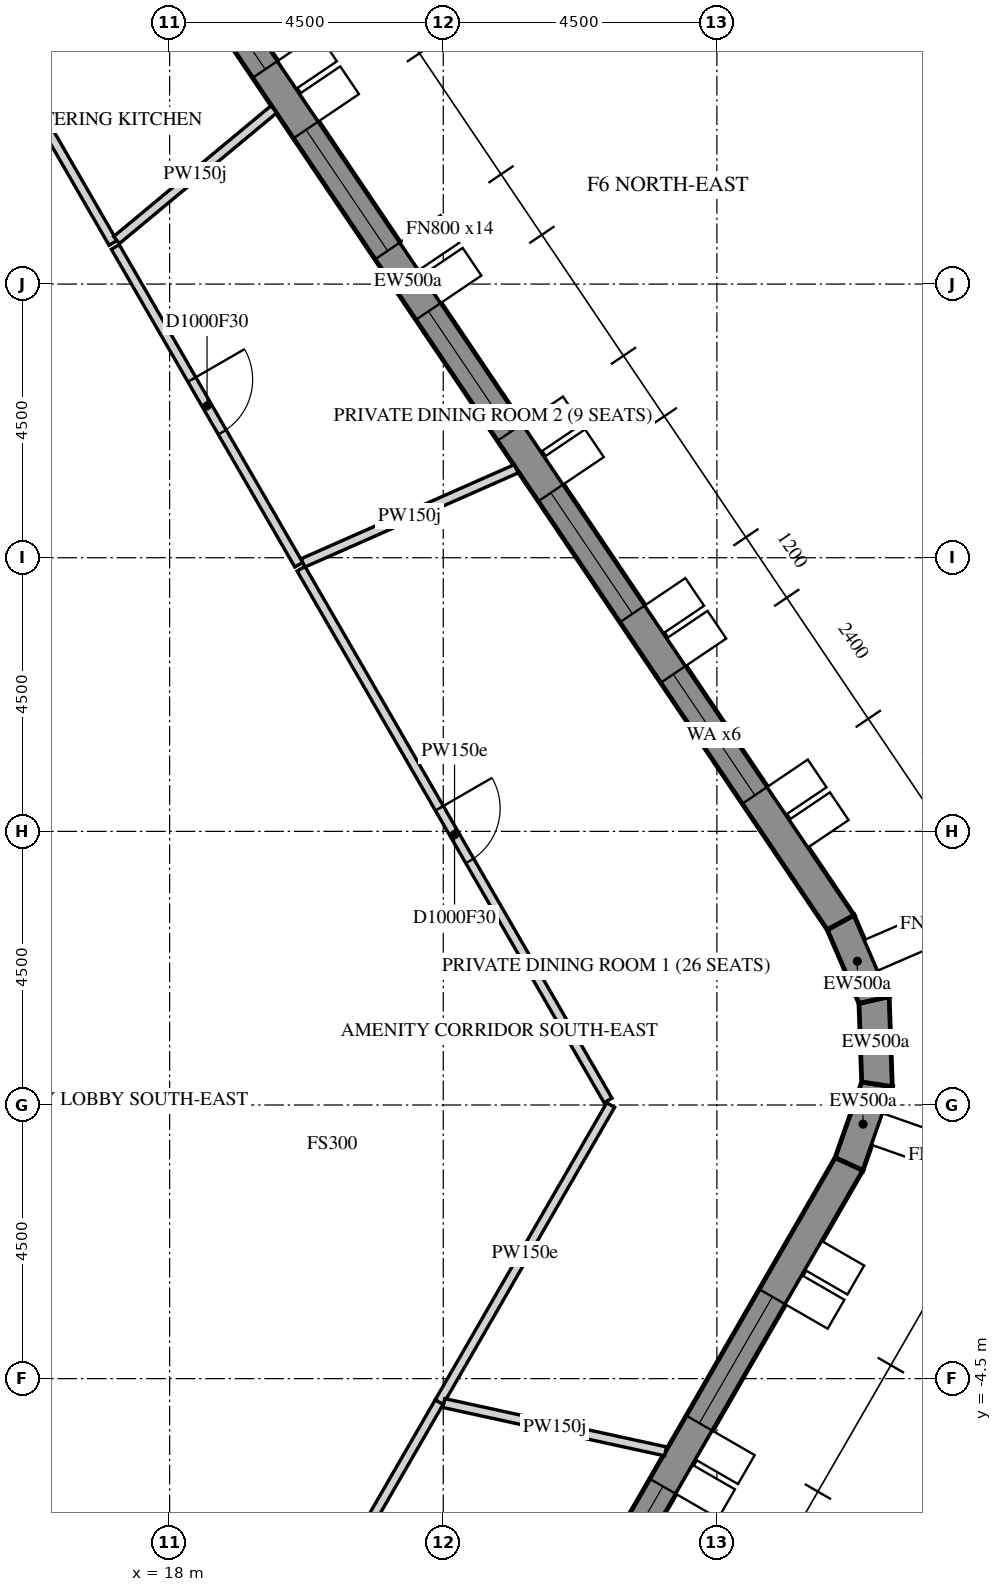
"""IFC4 building model, lengths in metres.
Left out: names, types, materials, properties, quantities, classifications, styles, units other than length and angle.
Written with IfcOpenShell. Run it as: python <this file> out.ifc"""

import sys

from ifc_helpers import new_model, si_unit, direction, frame, frame_2d, origin, place, context, subcontext, project, spatial, polyline, rectangle, outline, extrude, element, fill, save


model = new_model("IFC4")
c1 = context("Model", 3, precision=1e-05, world=origin(), true_north=direction((0.0, 1.0)))
c2 = subcontext(c1, "Body", "Model", "MODEL_VIEW")
j1 = project(units=[si_unit("LENGTHUNIT", "METRE"), si_unit("PLANEANGLEUNIT", "RADIAN")], contexts=[c1])
p1 = place(None, origin())
s1 = spatial("IfcSite", under=j1, at=p1, CompositionType="ELEMENT")
p2 = place(p1, origin())
s2 = spatial("IfcBuilding", under=s1, at=p2, CompositionType="ELEMENT")
p3 = place(p2, frame((0.0, 0.0, 338.1)))
s3 = spatial("IfcBuildingStorey", under=s2, at=p3, CompositionType="ELEMENT", Elevation=338.1)
p4 = place(p3, frame((16.451, -23.005, -0.3), z_axis=(0.0, 0.0, 1.0), x_axis=(0.500003737743, 0.866023245787, 0.0)))
e1 = element("IfcWall", 1, at=p4, inside=s3, PredefinedType="SOLIDWALL", context=c2, shape_type="SweptSolid", body=[
    extrude(outline(polyline([(-0.021, -0.25), (25.468, -0.25), (25.421, 0.25), (0.021, 0.25), (-0.021, -0.25)])), origin(), (0.0, 0.0, 1.0), 5.4),
])
p5 = place(p4, frame((2.522, 0.0, 1.2)))
e2 = element("IfcOpeningElement", 2, at=p5, cuts=e1, PredefinedType="OPENING", context=c2, shape_type="SweptSolid", body=[
    extrude(rectangle(XDim=2.4, YDim=3.6, at=frame_2d((1.2, 1.8))), frame((0.0, 0.26, 0.0), z_axis=(0.0, -1.0, 0.0), x_axis=(1.0, 0.0, 0.0)), (0.0, 0.0, 1.0), 0.52),
])
p6 = place(p4, frame((6.122, 0.0, 1.2)))
e3 = element("IfcOpeningElement", 3, at=p6, cuts=e1, PredefinedType="OPENING", context=c2, shape_type="SweptSolid", body=[
    extrude(rectangle(XDim=2.4, YDim=3.6, at=frame_2d((1.2, 1.8))), frame((0.0, 0.26, 0.0), z_axis=(0.0, -1.0, 0.0), x_axis=(1.0, 0.0, 0.0)), (0.0, 0.0, 1.0), 0.52),
])
p7 = place(p4, frame((9.722, 0.0, 1.2)))
e4 = element("IfcOpeningElement", 4, at=p7, cuts=e1, PredefinedType="OPENING", context=c2, shape_type="SweptSolid", body=[
    extrude(rectangle(XDim=2.4, YDim=3.6, at=frame_2d((1.2, 1.8))), frame((0.0, 0.26, 0.0), z_axis=(0.0, -1.0, 0.0), x_axis=(1.0, 0.0, 0.0)), (0.0, 0.0, 1.0), 0.52),
])
p8 = place(p4, frame((13.323, 0.0, 1.2)))
e5 = element("IfcOpeningElement", 5, at=p8, cuts=e1, PredefinedType="OPENING", context=c2, shape_type="SweptSolid", body=[
    extrude(rectangle(XDim=2.4, YDim=3.6, at=frame_2d((1.2, 1.8))), frame((0.0, 0.26, 0.0), z_axis=(0.0, -1.0, 0.0), x_axis=(1.0, 0.0, 0.0)), (0.0, 0.0, 1.0), 0.52),
])
p9 = place(p4, frame((16.922, 0.0, 1.2)))
e6 = element("IfcOpeningElement", 6, at=p9, cuts=e1, PredefinedType="OPENING", context=c2, shape_type="SweptSolid", body=[
    extrude(rectangle(XDim=2.4, YDim=3.6, at=frame_2d((1.2, 1.8))), frame((0.0, 0.26, 0.0), z_axis=(0.0, -1.0, 0.0), x_axis=(1.0, 0.0, 0.0)), (0.0, 0.0, 1.0), 0.52),
])
p10 = place(p4, frame((20.522, 0.0, 1.2)))
e7 = element("IfcOpeningElement", 7, at=p10, cuts=e1, PredefinedType="OPENING", context=c2, shape_type="SweptSolid", body=[
    extrude(rectangle(XDim=2.4, YDim=3.6, at=frame_2d((1.2, 1.8))), frame((0.0, 0.26, 0.0), z_axis=(0.0, -1.0, 0.0), x_axis=(1.0, 0.0, 0.0)), (0.0, 0.0, 1.0), 0.52),
])
p11 = place(p3, frame((29.174, -0.97, -0.3), z_axis=(0.0, 0.0, 1.0), x_axis=(0.330961348063, 0.943644311215, 0.0)))
e8 = element("IfcWall", 8, at=p11, inside=s3, PredefinedType="SOLIDWALL", context=c2, shape_type="SweptSolid", body=[
    extrude(outline(polyline([(-0.023, -0.25), (1.435, -0.25), (1.341, 0.25), (0.023, 0.25), (-0.023, -0.25)])), origin(), (0.0, 0.0, 1.0), 5.4),
])
p12 = place(p3, frame((29.633, 0.34, -0.3), z_axis=(0.0, 0.0, 1.0), x_axis=(-0.034825746769, 0.999393399699, 0.0)))
e9 = element("IfcWall", 9, at=p12, inside=s3, PredefinedType="SOLIDWALL", context=c2, shape_type="SweptSolid", body=[
    extrude(outline(polyline([(-0.047, -0.25), (1.435, -0.25), (1.341, 0.25), (0.047, 0.25), (-0.047, -0.25)])), origin(), (0.0, 0.0, 1.0), 5.4),
])
p13 = place(p3, frame((29.585, 1.728, -0.3), z_axis=(0.0, 0.0, 1.0), x_axis=(-0.396146339195, 0.918187387162, 0.0)))
e10 = element("IfcWall", 10, at=p13, inside=s3, PredefinedType="SOLIDWALL", context=c2, shape_type="SweptSolid", body=[
    extrude(outline(polyline([(-0.047, -0.25), (1.412, -0.25), (1.365, 0.25), (0.047, 0.25), (-0.047, -0.25)])), origin(), (0.0, 0.0, 1.0), 5.4),
])
p14 = place(p3, frame((29.035, 3.002, -0.3), z_axis=(0.0, 0.0, 1.0), x_axis=(-0.559195809204, 0.829035612606, 0.0)))
e11 = element("IfcWall", 11, at=p14, inside=s3, PredefinedType="SOLIDWALL", context=c2, shape_type="SweptSolid", body=[
    extrude(outline(polyline([(-0.023, -0.25), (25.465, -0.25), (25.424, 0.25), (0.023, 0.25), (-0.023, -0.25)])), origin(), (0.0, 0.0, 1.0), 5.4),
])
p15 = place(p14, frame((2.522, 0.0, 1.2)))
e12 = element("IfcOpeningElement", 12, at=p15, cuts=e11, PredefinedType="OPENING", context=c2, shape_type="SweptSolid", body=[
    extrude(rectangle(XDim=2.4, YDim=3.6, at=frame_2d((1.2, 1.8))), frame((0.0, 0.26, 0.0), z_axis=(0.0, -1.0, 0.0), x_axis=(1.0, 0.0, 0.0)), (0.0, 0.0, 1.0), 0.52),
])
p16 = place(p14, frame((6.122, 0.0, 1.2)))
e13 = element("IfcOpeningElement", 13, at=p16, cuts=e11, PredefinedType="OPENING", context=c2, shape_type="SweptSolid", body=[
    extrude(rectangle(XDim=2.4, YDim=3.6, at=frame_2d((1.2, 1.8))), frame((0.0, 0.26, 0.0), z_axis=(0.0, -1.0, 0.0), x_axis=(1.0, 0.0, 0.0)), (0.0, 0.0, 1.0), 0.52),
])
p17 = place(p14, frame((9.722, 0.0, 1.2)))
e14 = element("IfcOpeningElement", 14, at=p17, cuts=e11, PredefinedType="OPENING", context=c2, shape_type="SweptSolid", body=[
    extrude(rectangle(XDim=2.4, YDim=3.6, at=frame_2d((1.2, 1.8))), frame((0.0, 0.26, 0.0), z_axis=(0.0, -1.0, 0.0), x_axis=(1.0, 0.0, 0.0)), (0.0, 0.0, 1.0), 0.52),
])
p18 = place(p14, frame((13.323, 0.0, 1.2)))
e15 = element("IfcOpeningElement", 15, at=p18, cuts=e11, PredefinedType="OPENING", context=c2, shape_type="SweptSolid", body=[
    extrude(rectangle(XDim=2.4, YDim=3.6, at=frame_2d((1.2, 1.8))), frame((0.0, 0.26, 0.0), z_axis=(0.0, -1.0, 0.0), x_axis=(1.0, 0.0, 0.0)), (0.0, 0.0, 1.0), 0.52),
])
p19 = place(p14, frame((16.922, 0.0, 1.2)))
e16 = element("IfcOpeningElement", 16, at=p19, cuts=e11, PredefinedType="OPENING", context=c2, shape_type="SweptSolid", body=[
    extrude(rectangle(XDim=2.4, YDim=3.6, at=frame_2d((1.2, 1.8))), frame((0.0, 0.26, 0.0), z_axis=(0.0, -1.0, 0.0), x_axis=(1.0, 0.0, 0.0)), (0.0, 0.0, 1.0), 0.52),
])
p20 = place(p14, frame((20.522, 0.0, 1.2)))
e17 = element("IfcOpeningElement", 17, at=p20, cuts=e11, PredefinedType="OPENING", context=c2, shape_type="SweptSolid", body=[
    extrude(rectangle(XDim=2.4, YDim=3.6, at=frame_2d((1.2, 1.8))), frame((0.0, 0.26, 0.0), z_axis=(0.0, -1.0, 0.0), x_axis=(1.0, 0.0, 0.0)), (0.0, 0.0, 1.0), 0.52),
])
p21 = place(p3, frame((22.433, -4.885, 0.0), z_axis=(0.0, 0.0, 1.0), x_axis=(-0.500015036681, -0.866016722178, 0.0)))
e18 = element("IfcWall", 18, at=p21, inside=s3, PredefinedType="PARTITIONING", context=c2, shape_type="SweptSolid", body=[
    extrude(rectangle(XDim=19.382, YDim=0.15, at=frame_2d((9.691, 0.0))), origin(), (0.0, 0.0, 1.0), 5.1),
])
p22 = place(p21, frame((8.791, 0.0, 0.0)))
e19 = element("IfcOpeningElement", 19, at=p22, cuts=e18, PredefinedType="OPENING", context=c2, shape_type="SweptSolid", body=[
    extrude(rectangle(XDim=1.8, YDim=2.1, at=frame_2d((0.9, 1.05))), frame((0.0, 0.085, 0.0), z_axis=(0.0, -1.0, 0.0), x_axis=(1.0, 0.0, 0.0)), (0.0, 0.0, 1.0), 0.17),
])
p23 = place(p3, frame((12.742, 21.67, 0.0), z_axis=(0.0, 0.0, 1.0), x_axis=(0.500047259291, -0.865998116901, 0.0)))
e20 = element("IfcWall", 20, at=p23, inside=s3, PredefinedType="PARTITIONING", context=c2, shape_type="SweptSolid", body=[
    extrude(rectangle(XDim=8.654, YDim=0.15, at=frame_2d((4.327, 0.0))), origin(), (0.0, 0.0, 1.0), 5.1),
])
p24 = place(p23, frame((3.727, 0.0, 0.0)))
e21 = element("IfcOpeningElement", 21, at=p24, cuts=e20, PredefinedType="OPENING", context=c2, shape_type="SweptSolid", body=[
    extrude(rectangle(XDim=1.2, YDim=2.1, at=frame_2d((0.6, 1.05))), frame((0.0, 0.085, 0.0), z_axis=(0.0, -1.0, 0.0), x_axis=(1.0, 0.0, 0.0)), (0.0, 0.0, 1.0), 0.17),
])
p25 = place(p3, frame((19.714, 16.374, 0.0), z_axis=(0.0, 0.0, 1.0), x_axis=(-0.769119005656, -0.639105589976, 0.0)))
e22 = element("IfcWall", 22, at=p25, inside=s3, PredefinedType="PARTITIONING", context=c2, shape_type="SweptSolid", body=[
    extrude(rectangle(XDim=3.363, YDim=0.15, at=frame_2d((1.682, 0.0))), origin(), (0.0, 0.0, 1.0), 4.346),
])
p26 = place(p3, frame((17.107, 14.11, 0.0), z_axis=(0.0, 0.0, 1.0), x_axis=(0.499976943081, -0.866038715293, 0.0)))
e23 = element("IfcWall", 23, at=p26, inside=s3, PredefinedType="PARTITIONING", context=c2, shape_type="SweptSolid", body=[
    extrude(rectangle(XDim=6.034, YDim=0.15, at=frame_2d((3.017, 0.0))), origin(), (0.0, 0.0, 1.0), 5.1),
])
p27 = place(p26, frame((2.517, 0.0, 0.0)))
e24 = element("IfcOpeningElement", 24, at=p27, cuts=e23, PredefinedType="OPENING", context=c2, shape_type="SweptSolid", body=[
    extrude(rectangle(XDim=1.0, YDim=2.1, at=frame_2d((0.5, 1.05))), frame((0.0, 0.085, 0.0), z_axis=(0.0, -1.0, 0.0), x_axis=(1.0, 0.0, 0.0)), (0.0, 0.0, 1.0), 0.17),
])
p28 = place(p3, frame((22.433, -4.885, 0.0), z_axis=(0.0, 0.0, 1.0), x_axis=(0.499928530066, 0.866066663038, 0.0)))
e25 = element("IfcWall", 25, at=p28, inside=s3, PredefinedType="PARTITIONING", context=c2, shape_type="SweptSolid", body=[
    extrude(rectangle(XDim=5.64, YDim=0.15, at=frame_2d((2.82, 0.0))), origin(), (0.0, 0.0, 1.0), 5.1),
])
p29 = place(p3, frame((23.701, 10.463, 0.0), z_axis=(0.0, 0.0, 1.0), x_axis=(-0.914843094331, -0.403809500574, 0.0)))
e26 = element("IfcWall", 26, at=p29, inside=s3, PredefinedType="PARTITIONING", context=c2, shape_type="SweptSolid", body=[
    extrude(rectangle(XDim=3.834, YDim=0.15, at=frame_2d((1.917, 0.0))), origin(), (0.0, 0.0, 1.0), 4.346),
])
p30 = place(p3, frame((20.162, 8.819, 0.0), z_axis=(0.0, 0.0, 1.0), x_axis=(0.499995964007, -0.866027733953, 0.0)))
e27 = element("IfcWall", 27, at=p30, inside=s3, PredefinedType="PARTITIONING", context=c2, shape_type="SweptSolid", body=[
    extrude(rectangle(XDim=10.096, YDim=0.15, at=frame_2d((5.048, 0.0))), origin(), (0.0, 0.0, 1.0), 5.1),
])
p31 = place(p30, frame((4.548, 0.0, 0.0)))
e28 = element("IfcOpeningElement", 28, at=p31, cuts=e27, PredefinedType="OPENING", context=c2, shape_type="SweptSolid", body=[
    extrude(rectangle(XDim=1.0, YDim=2.1, at=frame_2d((0.5, 1.05))), frame((0.0, 0.085, 0.0), z_axis=(0.0, -1.0, 0.0), x_axis=(1.0, 0.0, 0.0)), (0.0, 0.0, 1.0), 0.17),
])
p32 = place(p3, frame((26.156, -5.696, 0.0), z_axis=(0.0, 0.0, 1.0), x_axis=(-0.977088296013, 0.212834352948, 0.0)))
e29 = element("IfcWall", 29, at=p32, inside=s3, PredefinedType="PARTITIONING", context=c2, shape_type="SweptSolid", body=[
    extrude(rectangle(XDim=3.731, YDim=0.15, at=frame_2d((1.866, 0.0))), origin(), (0.0, 0.0, 1.0), 4.346),
])
p33 = place(p9, frame((0.0, 0.18, 0.0)))
e30 = element("IfcWindow", 30, at=p33, inside=s3, PartitioningType="DOUBLE_PANEL_VERTICAL", PredefinedType="WINDOW", context=c2, shape_type="SweptSolid", body=[
    extrude(rectangle(XDim=2.4, YDim=3.6, at=frame_2d((1.2, 1.8))), frame((0.0, 0.03, 0.0), z_axis=(0.0, -1.0, 0.0), x_axis=(1.0, 0.0, 0.0)), (0.0, 0.0, 1.0), 0.06),
])
fill(e6, e30)
p34 = place(p10, frame((0.0, 0.18, 0.0)))
e31 = element("IfcWindow", 31, at=p34, inside=s3, PartitioningType="DOUBLE_PANEL_VERTICAL", PredefinedType="WINDOW", context=c2, shape_type="SweptSolid", body=[
    extrude(rectangle(XDim=2.4, YDim=3.6, at=frame_2d((1.2, 1.8))), frame((0.0, 0.03, 0.0), z_axis=(0.0, -1.0, 0.0), x_axis=(1.0, 0.0, 0.0)), (0.0, 0.0, 1.0), 0.06),
])
fill(e7, e31)
p35 = place(p15, frame((0.0, 0.18, 0.0)))
e32 = element("IfcWindow", 32, at=p35, inside=s3, PartitioningType="DOUBLE_PANEL_VERTICAL", PredefinedType="WINDOW", context=c2, shape_type="SweptSolid", body=[
    extrude(rectangle(XDim=2.4, YDim=3.6, at=frame_2d((1.2, 1.8))), frame((0.0, 0.03, 0.0), z_axis=(0.0, -1.0, 0.0), x_axis=(1.0, 0.0, 0.0)), (0.0, 0.0, 1.0), 0.06),
])
fill(e12, e32)
p36 = place(p16, frame((0.0, 0.18, 0.0)))
e33 = element("IfcWindow", 33, at=p36, inside=s3, PartitioningType="DOUBLE_PANEL_VERTICAL", PredefinedType="WINDOW", context=c2, shape_type="SweptSolid", body=[
    extrude(rectangle(XDim=2.4, YDim=3.6, at=frame_2d((1.2, 1.8))), frame((0.0, 0.03, 0.0), z_axis=(0.0, -1.0, 0.0), x_axis=(1.0, 0.0, 0.0)), (0.0, 0.0, 1.0), 0.06),
])
fill(e13, e33)
p37 = place(p17, frame((0.0, 0.18, 0.0)))
e34 = element("IfcWindow", 34, at=p37, inside=s3, PartitioningType="DOUBLE_PANEL_VERTICAL", PredefinedType="WINDOW", context=c2, shape_type="SweptSolid", body=[
    extrude(rectangle(XDim=2.4, YDim=3.6, at=frame_2d((1.2, 1.8))), frame((0.0, 0.03, 0.0), z_axis=(0.0, -1.0, 0.0), x_axis=(1.0, 0.0, 0.0)), (0.0, 0.0, 1.0), 0.06),
])
fill(e14, e34)
p38 = place(p18, frame((0.0, 0.18, 0.0)))
e35 = element("IfcWindow", 35, at=p38, inside=s3, PartitioningType="DOUBLE_PANEL_VERTICAL", PredefinedType="WINDOW", context=c2, shape_type="SweptSolid", body=[
    extrude(rectangle(XDim=2.4, YDim=3.6, at=frame_2d((1.2, 1.8))), frame((0.0, 0.03, 0.0), z_axis=(0.0, -1.0, 0.0), x_axis=(1.0, 0.0, 0.0)), (0.0, 0.0, 1.0), 0.06),
])
fill(e15, e35)
p39 = place(p19, frame((0.0, 0.18, 0.0)))
e36 = element("IfcWindow", 36, at=p39, inside=s3, PartitioningType="DOUBLE_PANEL_VERTICAL", PredefinedType="WINDOW", context=c2, shape_type="SweptSolid", body=[
    extrude(rectangle(XDim=2.4, YDim=3.6, at=frame_2d((1.2, 1.8))), frame((0.0, 0.03, 0.0), z_axis=(0.0, -1.0, 0.0), x_axis=(1.0, 0.0, 0.0)), (0.0, 0.0, 1.0), 0.06),
])
fill(e16, e36)
p40 = place(p27, origin())
e37 = element("IfcDoor", 37, at=p40, inside=s3, OperationType="SINGLE_SWING_RIGHT", PredefinedType="DOOR", context=c2, shape_type="SweptSolid", body=[
    extrude(rectangle(XDim=1.0, YDim=2.1, at=frame_2d((0.5, 1.05))), frame((0.0, 0.025, 0.0), z_axis=(0.0, -1.0, 0.0), x_axis=(1.0, 0.0, 0.0)), (0.0, 0.0, 1.0), 0.05),
])
fill(e24, e37)
p41 = place(p31, origin())
e38 = element("IfcDoor", 38, at=p41, inside=s3, OperationType="SINGLE_SWING_LEFT", PredefinedType="DOOR", context=c2, shape_type="SweptSolid", body=[
    extrude(rectangle(XDim=1.0, YDim=2.1, at=frame_2d((0.5, 1.05))), frame((0.0, 0.025, 0.0), z_axis=(0.0, -1.0, 0.0), x_axis=(1.0, 0.0, 0.0)), (0.0, 0.0, 1.0), 0.05),
])
fill(e28, e38)
save(model, sys.argv[1])
